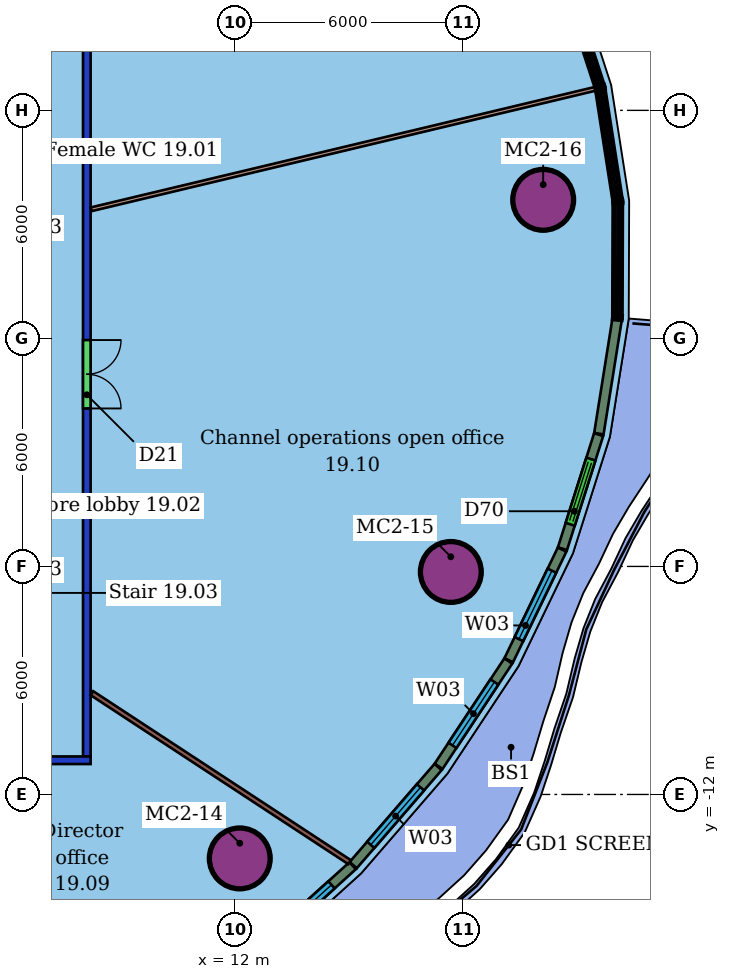
"""IFC4 building model, lengths in metres.
Left out: names, types, materials, properties, quantities, classifications, styles, units other than length and angle.
Written with IfcOpenShell. Run it as: python <this file> out.ifc"""

import sys

from ifc_helpers import new_model, si_unit, direction, frame, frame_2d, origin, origin_2d, place, context, subcontext, project, spatial, rectangle, hollow_circle, extrude, element, fill, save


model = new_model("IFC4")
c1 = context("Model", 3, precision=1e-05, world=origin(), true_north=direction((0.0, 1.0)))
c2 = subcontext(c1, "Body", "Model", "MODEL_VIEW")
j1 = project(units=[si_unit("LENGTHUNIT", "METRE"), si_unit("PLANEANGLEUNIT", "RADIAN")], contexts=[c1])
p1 = place(None, origin())
s1 = spatial("IfcSite", under=j1, at=p1, CompositionType="ELEMENT")
p2 = place(p1, origin())
s2 = spatial("IfcBuilding", under=s1, at=p2, CompositionType="ELEMENT")
p3 = place(p2, frame((0.0, 0.0, 88.6)))
s3 = spatial("IfcBuildingStorey", under=s2, at=p3, CompositionType="ELEMENT", Elevation=88.6)
for number, where, z_axis, x_axis in (
    (1, (12.125, -13.683, 0.0), (0.0, 0.0, 1.0), (1.0, 0.0, 0.0)),
    (2, (17.679, -6.146, 0.0), (0.0, 0.0, 1.0), (1.0, 0.0, 0.0)),
    (3, (20.109, 3.646, 0.0), (0.0, 0.0, 1.0), (1.0, 0.0, 0.0)),
):
    element("IfcColumn", number, at=place(p3, frame(where, z_axis=z_axis, x_axis=x_axis)), inside=s3, PredefinedType="COLUMN", context=c2, shape_type="SweptSolid", body=[
        extrude(hollow_circle(Radius=0.8, WallThickness=0.055, at=origin_2d()), origin(), (0.0, 0.0, 1.0), 3.45),
    ])
p4 = place(p3, frame((8.2, -11.1, 0.0), z_axis=(0.0, 0.0, 1.0), x_axis=(-1.0, 0.0, 0.0)))
e4 = element("IfcWall", 4, at=p4, inside=s3, PredefinedType="PARTITIONING", context=c2, shape_type="SweptSolid", body=[
    extrude(rectangle(XDim=28.4, YDim=0.2, at=frame_2d((14.2, 0.0))), origin(), (0.0, 0.0, 1.0), 3.0),
])
p5 = place(p4, frame((17.581, 0.0, 0.0)))
e5 = element("IfcOpeningElement", 5, at=p5, cuts=e4, PredefinedType="OPENING", context=c2, shape_type="SweptSolid", body=[
    extrude(rectangle(XDim=1.0, YDim=2.1, at=frame_2d((0.5, 1.05))), frame((0.0, 0.11, 0.0), z_axis=(0.0, -1.0, 0.0), x_axis=(1.0, 0.0, 0.0)), (0.0, 0.0, 1.0), 0.22),
])
p6 = place(p4, frame((6.998, 0.0, 0.0)))
e6 = element("IfcOpeningElement", 6, at=p6, cuts=e4, PredefinedType="OPENING", context=c2, shape_type="SweptSolid", body=[
    extrude(rectangle(XDim=1.5, YDim=2.1, at=frame_2d((0.75, 1.05))), frame((0.0, 0.11, 0.0), z_axis=(0.0, -1.0, 0.0), x_axis=(1.0, 0.0, 0.0)), (0.0, 0.0, 1.0), 0.22),
])
p7 = place(p4, frame((2.403, 0.0, 0.0)))
e7 = element("IfcOpeningElement", 7, at=p7, cuts=e4, PredefinedType="OPENING", context=c2, shape_type="SweptSolid", body=[
    extrude(rectangle(XDim=1.0, YDim=2.4, at=frame_2d((0.5, 1.2))), frame((0.0, 0.11, 0.0), z_axis=(0.0, -1.0, 0.0), x_axis=(1.0, 0.0, 0.0)), (0.0, 0.0, 1.0), 0.22),
])
p8 = place(p3, frame((8.1, 11.0, 0.0), z_axis=(0.0, 0.0, 1.0), x_axis=(0.0, -1.0, 0.0)))
e8 = element("IfcWall", 8, at=p8, inside=s3, PredefinedType="PARTITIONING", context=c2, shape_type="SweptSolid", body=[
    extrude(rectangle(XDim=22.0, YDim=0.2, at=frame_2d((11.0, 0.0))), origin(), (0.0, 0.0, 1.0), 3.0),
])
p9 = place(p8, frame((11.043, 0.0, 0.0)))
e9 = element("IfcOpeningElement", 9, at=p9, cuts=e8, PredefinedType="OPENING", context=c2, shape_type="SweptSolid", body=[
    extrude(rectangle(XDim=1.8, YDim=2.1, at=frame_2d((0.9, 1.05))), frame((0.0, 0.11, 0.0), z_axis=(0.0, -1.0, 0.0), x_axis=(1.0, 0.0, 0.0)), (0.0, 0.0, 1.0), 0.22),
])
p10 = place(p3, frame((21.484, 6.568, 0.0), z_axis=(0.0, 0.0, 1.0), x_axis=(-0.972613719836, -0.232427519856, 0.0)))
e10 = element("IfcWall", 10, at=p10, inside=s3, PredefinedType="PARTITIONING", context=c2, shape_type="SweptSolid", body=[
    extrude(rectangle(XDim=13.646, YDim=0.1, at=frame_2d((6.823, 0.0))), origin(), (0.0, 0.0, 1.0), 3.45),
])
p11 = place(p3, frame((9.496, -18.209, 0.0), z_axis=(0.0, 0.0, 1.0), x_axis=(-0.648104472947, 0.761551437624, 0.0)))
e11 = element("IfcWall", 11, at=p11, inside=s3, PredefinedType="PARTITIONING", context=c2, shape_type="SweptSolid", body=[
    extrude(rectangle(XDim=9.15, YDim=0.125, at=frame_2d((4.575, 0.0))), origin(), (0.0, 0.0, 1.0), 3.45),
])
p12 = place(p3, frame((15.013, -13.78, 0.0), z_axis=(0.0, 0.0, 1.0), x_axis=(-0.836224442923, 0.548387345822, 0.0)))
e12 = element("IfcWall", 12, at=p12, inside=s3, PredefinedType="PARTITIONING", context=c2, shape_type="SweptSolid", body=[
    extrude(rectangle(XDim=8.106, YDim=0.125, at=frame_2d((4.053, 0.0))), origin(), (0.0, 0.0, 1.0), 3.45),
])
p13 = place(p3, frame((12.5, -16.223, 0.0), z_axis=(0.0, 0.0, 1.0), x_axis=(0.741507668803, 0.670944391962, 0.0)))
e13 = element("IfcWall", 13, at=p13, inside=s3, PredefinedType="SOLIDWALL", context=c2, shape_type="SweptSolid", body=[
    extrude(rectangle(XDim=3.498, YDim=0.25, at=frame_2d((1.749, 0.0))), origin(), (0.0, 0.0, 1.0), 3.05),
])
p14 = place(p13, frame((0.749, 0.0, 0.9)))
e14 = element("IfcOpeningElement", 14, at=p14, cuts=e13, PredefinedType="OPENING", context=c2, shape_type="SweptSolid", body=[
    extrude(rectangle(XDim=2.0, YDim=2.1, at=frame_2d((1.0, 1.05))), frame((0.0, 0.135, 0.0), z_axis=(0.0, -1.0, 0.0), x_axis=(1.0, 0.0, 0.0)), (0.0, 0.0, 1.0), 0.27),
])
p15 = place(p3, frame((15.11, -13.859, 0.0), z_axis=(0.0, 0.0, 1.0), x_axis=(0.654178480437, 0.756340211633, 0.0)))
e15 = element("IfcWall", 15, at=p15, inside=s3, PredefinedType="SOLIDWALL", context=c2, shape_type="SweptSolid", body=[
    extrude(rectangle(XDim=3.413, YDim=0.25, at=frame_2d((1.706, 0.0))), origin(), (0.0, 0.0, 1.0), 3.05),
])
p16 = place(p15, frame((0.706, 0.0, 0.9)))
e16 = element("IfcOpeningElement", 16, at=p16, cuts=e15, PredefinedType="OPENING", context=c2, shape_type="SweptSolid", body=[
    extrude(rectangle(XDim=2.0, YDim=2.1, at=frame_2d((1.0, 1.05))), frame((0.0, 0.135, 0.0), z_axis=(0.0, -1.0, 0.0), x_axis=(1.0, 0.0, 0.0)), (0.0, 0.0, 1.0), 0.27),
])
p17 = place(p3, frame((17.357, -11.259, 0.0), z_axis=(0.0, 0.0, 1.0), x_axis=(0.551983407384, 0.83385509411, 0.0)))
e17 = element("IfcWall", 17, at=p17, inside=s3, PredefinedType="SOLIDWALL", context=c2, shape_type="SweptSolid", body=[
    extrude(rectangle(XDim=3.322, YDim=0.25, at=frame_2d((1.661, 0.0))), origin(), (0.0, 0.0, 1.0), 3.05),
])
p18 = place(p17, frame((0.661, 0.0, 0.9)))
e18 = element("IfcOpeningElement", 18, at=p18, cuts=e17, PredefinedType="OPENING", context=c2, shape_type="SweptSolid", body=[
    extrude(rectangle(XDim=2.0, YDim=2.1, at=frame_2d((1.0, 1.05))), frame((0.0, 0.135, 0.0), z_axis=(0.0, -1.0, 0.0), x_axis=(1.0, 0.0, 0.0)), (0.0, 0.0, 1.0), 0.27),
])
p19 = place(p3, frame((19.203, -8.468, 0.0), z_axis=(0.0, 0.0, 1.0), x_axis=(0.434506070547, 0.900668904014, 0.0)))
e19 = element("IfcWall", 19, at=p19, inside=s3, PredefinedType="SOLIDWALL", context=c2, shape_type="SweptSolid", body=[
    extrude(rectangle(XDim=3.231, YDim=0.25, at=frame_2d((1.616, 0.0))), origin(), (0.0, 0.0, 1.0), 3.05),
])
p20 = place(p19, frame((0.616, 0.0, 0.9)))
e20 = element("IfcOpeningElement", 20, at=p20, cuts=e19, PredefinedType="OPENING", context=c2, shape_type="SweptSolid", body=[
    extrude(rectangle(XDim=2.0, YDim=2.1, at=frame_2d((1.0, 1.05))), frame((0.0, 0.135, 0.0), z_axis=(0.0, -1.0, 0.0), x_axis=(1.0, 0.0, 0.0)), (0.0, 0.0, 1.0), 0.27),
])
p21 = place(p3, frame((20.616, -5.533, 0.0), z_axis=(0.0, 0.0, 1.0), x_axis=(0.302352129866, 0.953196301695, 0.0)))
e21 = element("IfcWall", 21, at=p21, inside=s3, PredefinedType="SOLIDWALL", context=c2, shape_type="SweptSolid", body=[
    extrude(rectangle(XDim=3.148, YDim=0.25, at=frame_2d((1.574, 0.0))), origin(), (0.0, 0.0, 1.0), 3.05),
])
p22 = place(p21, frame((0.674, 0.0, 0.0)))
e22 = element("IfcOpeningElement", 22, at=p22, cuts=e21, PredefinedType="OPENING", context=c2, shape_type="SweptSolid", body=[
    extrude(rectangle(XDim=1.8, YDim=2.4, at=frame_2d((0.9, 1.2))), frame((0.0, 0.135, 0.0), z_axis=(0.0, -1.0, 0.0), x_axis=(1.0, 0.0, 0.0)), (0.0, 0.0, 1.0), 0.27),
])
p23 = place(p3, frame((21.574, -2.507, 0.0), z_axis=(0.0, 0.0, 1.0), x_axis=(0.157539068882, 0.987512755247, 0.0)))
e23 = element("IfcWall", 23, at=p23, inside=s3, PredefinedType="SOLIDWALL", context=c2, shape_type="SweptSolid", body=[
    extrude(rectangle(XDim=3.037, YDim=0.25, at=frame_2d((1.519, 0.0))), origin(), (0.0, 0.0, 1.0), 3.05),
])
p24 = place(p9, origin())
e24 = element("IfcDoor", 24, at=p24, inside=s3, OperationType="DOUBLE_DOOR_SINGLE_SWING", PredefinedType="DOOR", context=c2, shape_type="SweptSolid", body=[
    extrude(rectangle(XDim=1.8, YDim=2.1, at=frame_2d((0.9, 1.05))), frame((0.0, 0.025, 0.0), z_axis=(0.0, -1.0, 0.0), x_axis=(1.0, 0.0, 0.0)), (0.0, 0.0, 1.0), 0.05),
])
fill(e9, e24)
p25 = place(p14, origin())
e25 = element("IfcWindow", 25, at=p25, inside=s3, PartitioningType="SINGLE_PANEL", PredefinedType="WINDOW", context=c2, shape_type="SweptSolid", body=[
    extrude(rectangle(XDim=2.0, YDim=2.1, at=frame_2d((1.0, 1.05))), frame((0.0, 0.03, 0.0), z_axis=(0.0, -1.0, 0.0), x_axis=(1.0, 0.0, 0.0)), (0.0, 0.0, 1.0), 0.06),
])
fill(e14, e25)
p26 = place(p16, origin())
e26 = element("IfcWindow", 26, at=p26, inside=s3, PartitioningType="SINGLE_PANEL", PredefinedType="WINDOW", context=c2, shape_type="SweptSolid", body=[
    extrude(rectangle(XDim=2.0, YDim=2.1, at=frame_2d((1.0, 1.05))), frame((0.0, 0.03, 0.0), z_axis=(0.0, -1.0, 0.0), x_axis=(1.0, 0.0, 0.0)), (0.0, 0.0, 1.0), 0.06),
])
fill(e16, e26)
p27 = place(p18, origin())
e27 = element("IfcWindow", 27, at=p27, inside=s3, PartitioningType="SINGLE_PANEL", PredefinedType="WINDOW", context=c2, shape_type="SweptSolid", body=[
    extrude(rectangle(XDim=2.0, YDim=2.1, at=frame_2d((1.0, 1.05))), frame((0.0, 0.03, 0.0), z_axis=(0.0, -1.0, 0.0), x_axis=(1.0, 0.0, 0.0)), (0.0, 0.0, 1.0), 0.06),
])
fill(e18, e27)
p28 = place(p20, origin())
e28 = element("IfcWindow", 28, at=p28, inside=s3, PartitioningType="SINGLE_PANEL", PredefinedType="WINDOW", context=c2, shape_type="SweptSolid", body=[
    extrude(rectangle(XDim=2.0, YDim=2.1, at=frame_2d((1.0, 1.05))), frame((0.0, 0.03, 0.0), z_axis=(0.0, -1.0, 0.0), x_axis=(1.0, 0.0, 0.0)), (0.0, 0.0, 1.0), 0.06),
])
fill(e20, e28)
p29 = place(p22, origin())
e29 = element("IfcDoor", 29, at=p29, inside=s3, OperationType="DOUBLE_DOOR_SLIDING", PredefinedType="DOOR", context=c2, shape_type="SweptSolid", body=[
    extrude(rectangle(XDim=1.8, YDim=2.4, at=frame_2d((0.9, 1.2))), frame((0.0, 0.025, 0.0), z_axis=(0.0, -1.0, 0.0), x_axis=(1.0, 0.0, 0.0)), (0.0, 0.0, 1.0), 0.05),
])
fill(e22, e29)
save(model, sys.argv[1])
